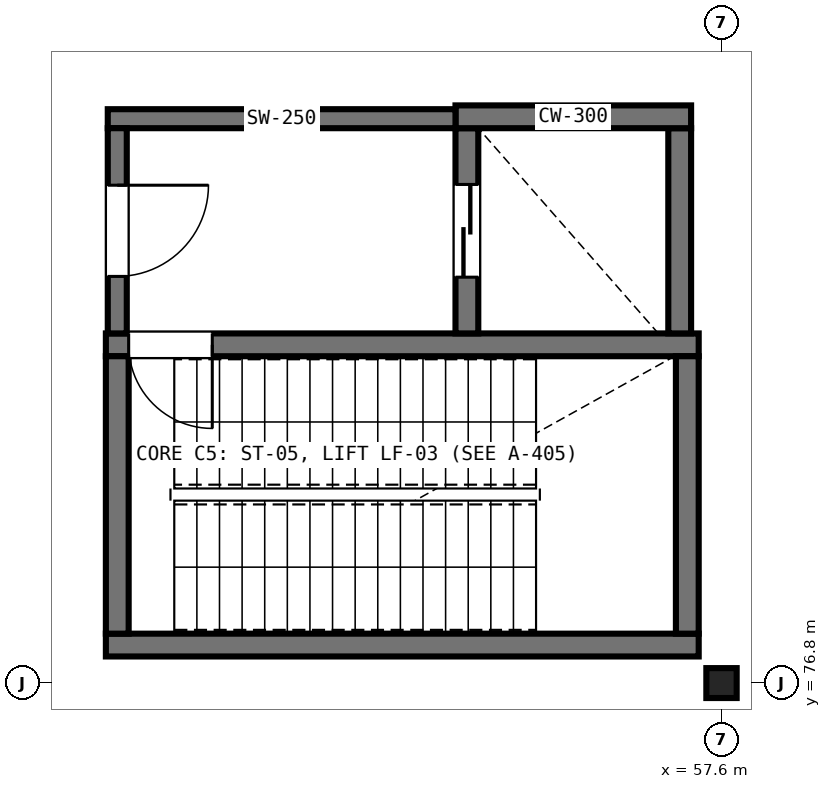
"""IFC4 building model, lengths in metres.
Left out: names, types, materials, properties, quantities, classifications, styles, units other than length and angle.
Written with IfcOpenShell. Run it as: python <this file> out.ifc"""

import sys

from ifc_helpers import new_model, si_unit, direction, frame, frame_2d, origin, origin_2d, place, context, subcontext, project, spatial, rectangle, i_section, extrude, element, fill, save


model = new_model("IFC4")
c1 = context("Model", 3, precision=1e-05, world=origin(), true_north=direction((0.0, 1.0)))
c2 = subcontext(c1, "Body", "Model", "MODEL_VIEW")
j1 = project(units=[si_unit("LENGTHUNIT", "METRE"), si_unit("PLANEANGLEUNIT", "RADIAN")], contexts=[c1])
p1 = place(None, origin())
s1 = spatial("IfcSite", under=j1, at=p1, CompositionType="ELEMENT")
p2 = place(p1, origin())
s2 = spatial("IfcBuilding", under=s1, at=p2, CompositionType="ELEMENT")
p3 = place(p2, origin())
s3 = spatial("IfcBuildingStorey", under=s2, at=p3, CompositionType="ELEMENT", Elevation=0.0)
p4 = place(p3, frame((57.6, 76.8, 0.0), z_axis=(0.0, 0.0, 1.0), x_axis=(1.0, 0.0, 0.0)))
e1 = element("IfcColumn", 1, at=p4, inside=s3, PredefinedType="COLUMN", context=c2, shape_type="SweptSolid", body=[
    extrude(i_section(OverallWidth=0.399, OverallDepth=0.394, WebThickness=0.023, FlangeThickness=0.037, FilletRadius=0.015, at=origin_2d()), origin(), (0.0, 0.0, 1.0), 5.75),
])
p5 = place(p3, frame((49.5, 77.3, 0.0), z_axis=(0.0, 0.0, 1.0), x_axis=(1.0, 0.0, 0.0)))
e2 = element("IfcWall", 2, at=p5, inside=s3, PredefinedType="SHEAR", context=c2, shape_type="SweptSolid", body=[
    extrude(rectangle(XDim=7.8, YDim=0.3, at=frame_2d((3.9, 0.0))), origin(), (0.0, 0.0, 1.0), 5.75),
])
p6 = place(p3, frame((57.3, 81.25, 0.0), z_axis=(0.0, 0.0, 1.0), x_axis=(-1.0, 0.0, 0.0)))
e3 = element("IfcWall", 3, at=p6, inside=s3, PredefinedType="SHEAR", context=c2, shape_type="SweptSolid", body=[
    extrude(rectangle(XDim=7.8, YDim=0.3, at=frame_2d((3.9, 0.0))), origin(), (0.0, 0.0, 1.0), 5.75),
])
p7 = place(p6, frame((6.4, 0.0, 0.0)))
e4 = element("IfcOpeningElement", 4, at=p7, cuts=e3, PredefinedType="OPENING", context=c2, shape_type="SweptSolid", body=[
    extrude(rectangle(XDim=1.1, YDim=2.15, at=frame_2d((0.55, 1.075))), frame((0.0, 0.16, 0.0), z_axis=(0.0, -1.0, 0.0), x_axis=(1.0, 0.0, 0.0)), (0.0, 0.0, 1.0), 0.32),
])
for number, where, z_axis, x_axis in (
    (5, (49.65, 77.45, 0.0), (0.0, 0.0, 1.0), (0.0, 1.0, 0.0)),
    (6, (57.15, 81.1, 0.0), (0.0, 0.0, 1.0), (0.0, -1.0, 0.0)),
):
    element("IfcWall", number, at=place(p3, frame(where, z_axis=z_axis, x_axis=x_axis)), inside=s3, PredefinedType="SHEAR", context=c2, shape_type="SweptSolid", body=[
        extrude(rectangle(XDim=3.65, YDim=0.3, at=frame_2d((1.825, 0.0))), origin(), (0.0, 0.0, 1.0), 5.75),
    ])
p8 = place(p3, frame((54.25, 84.1, 0.0), z_axis=(0.0, 0.0, 1.0), x_axis=(0.0, -1.0, 0.0)))
e7 = element("IfcWall", 7, at=p8, inside=s3, PredefinedType="SHEAR", context=c2, shape_type="SweptSolid", body=[
    extrude(rectangle(XDim=2.7, YDim=0.3, at=frame_2d((1.35, 0.0))), origin(), (0.0, 0.0, 1.0), 5.75),
])
p9 = place(p8, frame((0.74, 0.0, 0.0)))
e8 = element("IfcOpeningElement", 8, at=p9, cuts=e7, PredefinedType="OPENING", context=c2, shape_type="SweptSolid", body=[
    extrude(rectangle(XDim=1.22, YDim=2.15, at=frame_2d((0.61, 1.075))), frame((0.0, 0.16, 0.0), z_axis=(0.0, -1.0, 0.0), x_axis=(1.0, 0.0, 0.0)), (0.0, 0.0, 1.0), 0.32),
])
p10 = place(p3, frame((57.05, 81.4, 0.0), z_axis=(0.0, 0.0, 1.0), x_axis=(0.0, 1.0, 0.0)))
e9 = element("IfcWall", 9, at=p10, inside=s3, PredefinedType="SHEAR", context=c2, shape_type="SweptSolid", body=[
    extrude(rectangle(XDim=2.7, YDim=0.3, at=frame_2d((1.35, 0.0))), origin(), (0.0, 0.0, 1.0), 5.75),
])
p11 = place(p3, frame((54.1, 84.25, 0.0), z_axis=(0.0, 0.0, 1.0), x_axis=(1.0, 0.0, 0.0)))
e10 = element("IfcWall", 10, at=p11, inside=s3, PredefinedType="SHEAR", context=c2, shape_type="SweptSolid", body=[
    extrude(rectangle(XDim=3.1, YDim=0.3, at=frame_2d((1.55, 0.0))), origin(), (0.0, 0.0, 1.0), 5.75),
])
p12 = place(p3, frame((54.1, 84.225, 0.0), z_axis=(0.0, 0.0, 1.0), x_axis=(-1.0, 0.0, 0.0)))
e11 = element("IfcWall", 11, at=p12, inside=s3, PredefinedType="SHEAR", context=c2, shape_type="SweptSolid", body=[
    extrude(rectangle(XDim=4.575, YDim=0.25, at=frame_2d((2.288, 0.0))), origin(), (0.0, 0.0, 1.0), 5.75),
])
p13 = place(p3, frame((49.65, 81.4, 0.0), z_axis=(0.0, 0.0, 1.0), x_axis=(0.0, 1.0, 0.0)))
e12 = element("IfcWall", 12, at=p13, inside=s3, PredefinedType="SHEAR", context=c2, shape_type="SweptSolid", body=[
    extrude(rectangle(XDim=2.7, YDim=0.25, at=frame_2d((1.35, 0.0))), origin(), (0.0, 0.0, 1.0), 5.75),
])
p14 = place(p13, frame((0.75, 0.0, 0.0)))
e13 = element("IfcOpeningElement", 13, at=p14, cuts=e12, PredefinedType="OPENING", context=c2, shape_type="SweptSolid", body=[
    extrude(rectangle(XDim=1.2, YDim=2.15, at=frame_2d((0.6, 1.075))), frame((0.0, 0.135, 0.0), z_axis=(0.0, -1.0, 0.0), x_axis=(1.0, 0.0, 0.0)), (0.0, 0.0, 1.0), 0.27),
])
p15 = place(p7, origin())
e14 = element("IfcDoor", 14, at=p15, inside=s3, OperationType="SINGLE_SWING_LEFT", PredefinedType="DOOR", context=c2, shape_type="SweptSolid", body=[
    extrude(rectangle(XDim=1.1, YDim=2.15, at=frame_2d((0.55, 1.075))), frame((0.0, 0.025, 0.0), z_axis=(0.0, -1.0, 0.0), x_axis=(1.0, 0.0, 0.0)), (0.0, 0.0, 1.0), 0.05),
])
fill(e4, e14)
p16 = place(p9, frame((1.22, 0.0, 0.0), z_axis=(0.0, 0.0, 1.0), x_axis=(-1.0, 0.0, 0.0)))
e15 = element("IfcDoor", 15, at=p16, inside=s3, OperationType="DOUBLE_DOOR_SLIDING", PredefinedType="DOOR", context=c2, shape_type="SweptSolid", body=[
    extrude(rectangle(XDim=1.22, YDim=2.15, at=frame_2d((0.61, 1.075))), frame((0.0, 0.025, 0.0), z_axis=(0.0, -1.0, 0.0), x_axis=(1.0, 0.0, 0.0)), (0.0, 0.0, 1.0), 0.05),
])
fill(e8, e15)
p17 = place(p14, frame((1.2, 0.0, 0.0), z_axis=(0.0, 0.0, 1.0), x_axis=(-1.0, 0.0, 0.0)))
e16 = element("IfcDoor", 16, at=p17, inside=s3, OperationType="SINGLE_SWING_RIGHT", PredefinedType="DOOR", context=c2, shape_type="SweptSolid", body=[
    extrude(rectangle(XDim=1.2, YDim=2.15, at=frame_2d((0.6, 1.075))), frame((0.0, 0.025, 0.0), z_axis=(0.0, -1.0, 0.0), x_axis=(1.0, 0.0, 0.0)), (0.0, 0.0, 1.0), 0.05),
])
fill(e13, e16)
save(model, sys.argv[1])
